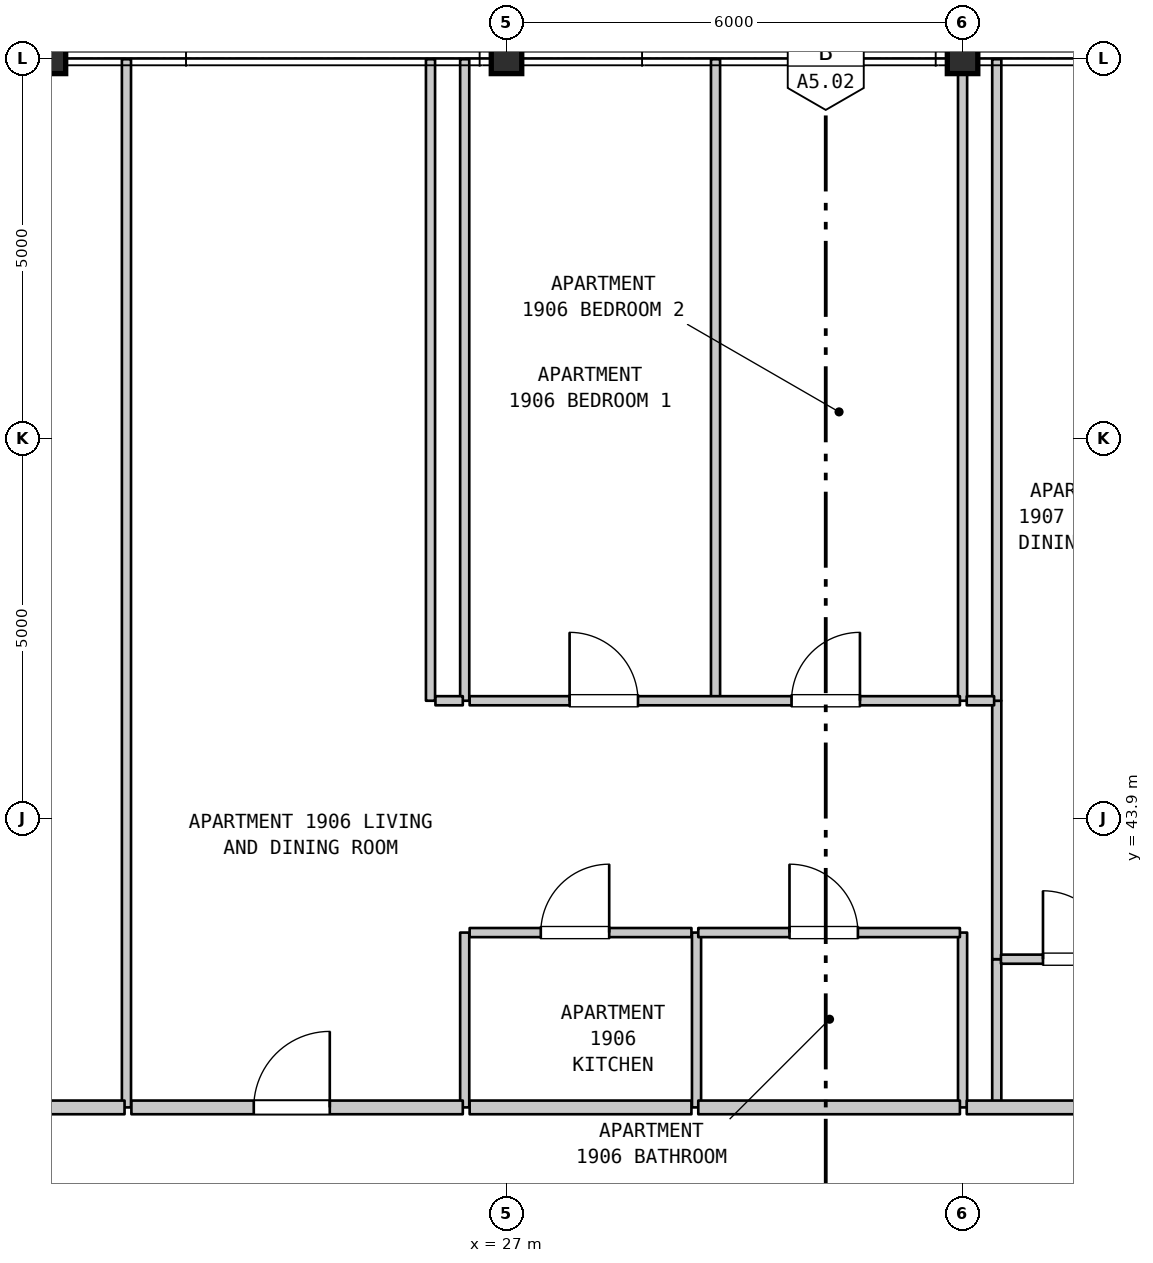
"""IFC4 building model, lengths in metres.
Left out: names, types, materials, properties, quantities, classifications, styles, units other than length and angle.
Written with IfcOpenShell. Run it as: python <this file> out.ifc"""

import sys

from ifc_helpers import new_model, si_unit, direction, frame, frame_2d, origin, origin_2d, place, context, subcontext, project, spatial, rectangle, i_section, extrude, element, fill, save


model = new_model("IFC4")
c1 = context("Model", 3, precision=1e-05, world=origin(), true_north=direction((0.0, 1.0)))
c2 = subcontext(c1, "Body", "Model", "MODEL_VIEW")
j1 = project(units=[si_unit("LENGTHUNIT", "METRE"), si_unit("PLANEANGLEUNIT", "RADIAN")], contexts=[c1])
p1 = place(None, origin())
s1 = spatial("IfcSite", under=j1, at=p1, CompositionType="ELEMENT")
p2 = place(p1, origin())
s2 = spatial("IfcBuilding", under=s1, at=p2, CompositionType="ELEMENT")
p3 = place(p2, frame((0.0, 0.0, 81.2)))
s3 = spatial("IfcBuildingStorey", under=s2, at=p3, CompositionType="ELEMENT", Elevation=81.2)
for number, where, z_axis, x_axis in (
    (1, (21.0, 53.9, 0.0), (0.0, 0.0, 1.0), (1.0, 0.0, 0.0)),
    (2, (27.0, 53.9, 0.0), (0.0, 0.0, 1.0), (1.0, 0.0, 0.0)),
    (3, (33.0, 53.9, 0.0), (0.0, 0.0, 1.0), (1.0, 0.0, 0.0)),
):
    element("IfcColumn", number, at=place(p3, frame(where, z_axis=z_axis, x_axis=x_axis)), inside=s3, PredefinedType="COLUMN", context=c2, shape_type="SweptSolid", body=[
        extrude(i_section(OverallWidth=0.401, OverallDepth=0.399, WebThickness=0.025, FlangeThickness=0.04, FilletRadius=0.015, at=origin_2d()), origin(), (0.0, 0.0, 1.0), 5.2),
    ])
p4 = place(p3, frame((22.0, 40.1, 0.0), z_axis=(0.0, 0.0, 1.0), x_axis=(0.0, 1.0, 0.0)))
e4 = element("IfcWall", 4, at=p4, inside=s3, PredefinedType="PARTITIONING", context=c2, shape_type="SweptSolid", body=[
    extrude(rectangle(XDim=13.79, YDim=0.12, at=frame_2d((6.895, 0.0))), origin(), (0.0, 0.0, 1.0), 4.885),
])
p5 = place(p3, frame((26.0, 45.45, 0.0), z_axis=(0.0, 0.0, 1.0), x_axis=(0.0, 1.0, 0.0)))
e5 = element("IfcWall", 5, at=p5, inside=s3, PredefinedType="PARTITIONING", context=c2, shape_type="SweptSolid", body=[
    extrude(rectangle(XDim=8.44, YDim=0.12, at=frame_2d((4.22, 0.0))), origin(), (0.0, 0.0, 1.0), 4.885),
])
p6 = place(p3, frame((26.45, 40.1, 0.0), z_axis=(0.0, 0.0, 1.0), x_axis=(0.0, 1.0, 0.0)))
e6 = element("IfcWall", 6, at=p6, inside=s3, PredefinedType="PARTITIONING", context=c2, shape_type="SweptSolid", body=[
    extrude(rectangle(XDim=2.3, YDim=0.12, at=frame_2d((1.15, 0.0))), origin(), (0.0, 0.0, 1.0), 4.885),
])
p7 = place(p3, frame((26.45, 45.45, 0.0), z_axis=(0.0, 0.0, 1.0), x_axis=(0.0, 1.0, 0.0)))
e7 = element("IfcWall", 7, at=p7, inside=s3, PredefinedType="PARTITIONING", context=c2, shape_type="SweptSolid", body=[
    extrude(rectangle(XDim=8.44, YDim=0.12, at=frame_2d((4.22, 0.0))), origin(), (0.0, 0.0, 1.0), 4.885),
])
p8 = place(p3, frame((29.5, 40.1, 0.0), z_axis=(0.0, 0.0, 1.0), x_axis=(0.0, 1.0, 0.0)))
e8 = element("IfcWall", 8, at=p8, inside=s3, PredefinedType="PARTITIONING", context=c2, shape_type="SweptSolid", body=[
    extrude(rectangle(XDim=2.3, YDim=0.12, at=frame_2d((1.15, 0.0))), origin(), (0.0, 0.0, 1.0), 4.885),
])
p9 = place(p3, frame((29.75, 45.45, 0.0), z_axis=(0.0, 0.0, 1.0), x_axis=(0.0, 1.0, 0.0)))
e9 = element("IfcWall", 9, at=p9, inside=s3, PredefinedType="PARTITIONING", context=c2, shape_type="SweptSolid", body=[
    extrude(rectangle(XDim=8.44, YDim=0.12, at=frame_2d((4.22, 0.0))), origin(), (0.0, 0.0, 1.0), 4.885),
])
p10 = place(p3, frame((33.0, 40.1, 0.0), z_axis=(0.0, 0.0, 1.0), x_axis=(0.0, 1.0, 0.0)))
e10 = element("IfcWall", 10, at=p10, inside=s3, PredefinedType="PARTITIONING", context=c2, shape_type="SweptSolid", body=[
    extrude(rectangle(XDim=2.3, YDim=0.12, at=frame_2d((1.15, 0.0))), origin(), (0.0, 0.0, 1.0), 4.285),
])
p11 = place(p3, frame((33.0, 45.45, 0.0), z_axis=(0.0, 0.0, 1.0), x_axis=(0.0, 1.0, 0.0)))
e11 = element("IfcWall", 11, at=p11, inside=s3, PredefinedType="PARTITIONING", context=c2, shape_type="SweptSolid", body=[
    extrude(rectangle(XDim=8.44, YDim=0.12, at=frame_2d((4.22, 0.0))), origin(), (0.0, 0.0, 1.0), 4.285),
])
p12 = place(p3, frame((33.45, 40.1, 0.0), z_axis=(0.0, 0.0, 1.0), x_axis=(0.0, 1.0, 0.0)))
e12 = element("IfcWall", 12, at=p12, inside=s3, PredefinedType="PARTITIONING", context=c2, shape_type="SweptSolid", body=[
    extrude(rectangle(XDim=1.95, YDim=0.12, at=frame_2d((0.975, 0.0))), origin(), (0.0, 0.0, 1.0), 4.885),
])
p13 = place(p3, frame((33.45, 42.05, 0.0), z_axis=(0.0, 0.0, 1.0), x_axis=(0.0, 1.0, 0.0)))
e13 = element("IfcWall", 13, at=p13, inside=s3, PredefinedType="PARTITIONING", context=c2, shape_type="SweptSolid", body=[
    extrude(rectangle(XDim=3.4, YDim=0.12, at=frame_2d((1.7, 0.0))), origin(), (0.0, 0.0, 1.0), 4.885),
])
p14 = place(p3, frame((33.45, 45.45, 0.0), z_axis=(0.0, 0.0, 1.0), x_axis=(0.0, 1.0, 0.0)))
e14 = element("IfcWall", 14, at=p14, inside=s3, PredefinedType="PARTITIONING", context=c2, shape_type="SweptSolid", body=[
    extrude(rectangle(XDim=8.44, YDim=0.12, at=frame_2d((4.22, 0.0))), origin(), (0.0, 0.0, 1.0), 4.885),
])
p15 = place(p3, frame((19.565, 40.1, 0.0), z_axis=(0.0, 0.0, 1.0), x_axis=(1.0, 0.0, 0.0)))
e15 = element("IfcWall", 15, at=p15, inside=s3, PredefinedType="STANDARD", context=c2, shape_type="SweptSolid", body=[
    extrude(rectangle(XDim=2.41, YDim=0.18, at=frame_2d((1.205, 0.0))), origin(), (0.0, 0.0, 1.0), 4.885),
])
p16 = place(p3, frame((22.065, 40.1, 0.0), z_axis=(0.0, 0.0, 1.0), x_axis=(1.0, 0.0, 0.0)))
e16 = element("IfcWall", 16, at=p16, inside=s3, PredefinedType="STANDARD", context=c2, shape_type="SweptSolid", body=[
    extrude(rectangle(XDim=4.36, YDim=0.18, at=frame_2d((2.18, 0.0))), origin(), (0.0, 0.0, 1.0), 4.885),
])
p17 = place(p16, frame((1.61, 0.0, 0.0)))
e17 = element("IfcOpeningElement", 17, at=p17, cuts=e16, PredefinedType="OPENING", context=c2, shape_type="SweptSolid", body=[
    extrude(rectangle(XDim=1.0, YDim=2.15, at=frame_2d((0.5, 1.075))), frame((0.0, 0.1, 0.0), z_axis=(0.0, -1.0, 0.0), x_axis=(1.0, 0.0, 0.0)), (0.0, 0.0, 1.0), 0.2),
])
p18 = place(p3, frame((26.515, 40.1, 0.0), z_axis=(0.0, 0.0, 1.0), x_axis=(1.0, 0.0, 0.0)))
e18 = element("IfcWall", 18, at=p18, inside=s3, PredefinedType="STANDARD", context=c2, shape_type="SweptSolid", body=[
    extrude(rectangle(XDim=2.918, YDim=0.18, at=frame_2d((1.459, 0.0))), origin(), (0.0, 0.0, 1.0), 4.885),
])
p19 = place(p3, frame((29.523, 40.1, 0.0), z_axis=(0.0, 0.0, 1.0), x_axis=(1.0, 0.0, 0.0)))
e19 = element("IfcWall", 19, at=p19, inside=s3, PredefinedType="STANDARD", context=c2, shape_type="SweptSolid", body=[
    extrude(rectangle(XDim=3.442, YDim=0.18, at=frame_2d((1.721, 0.0))), origin(), (0.0, 0.0, 1.0), 4.885),
])
p20 = place(p3, frame((33.055, 40.1, 0.0), z_axis=(0.0, 0.0, 1.0), x_axis=(1.0, 0.0, 0.0)))
e20 = element("IfcWall", 20, at=p20, inside=s3, PredefinedType="STANDARD", context=c2, shape_type="SweptSolid", body=[
    extrude(rectangle(XDim=5.445, YDim=0.18, at=frame_2d((2.723, 0.0))), origin(), (0.0, 0.0, 1.0), 4.885),
])
p21 = place(p20, frame((2.455, 0.0, 0.0)))
e21 = element("IfcOpeningElement", 21, at=p21, cuts=e20, PredefinedType="OPENING", context=c2, shape_type="SweptSolid", body=[
    extrude(rectangle(XDim=1.0, YDim=2.15, at=frame_2d((0.5, 1.075))), frame((0.0, 0.1, 0.0), z_axis=(0.0, -1.0, 0.0), x_axis=(1.0, 0.0, 0.0)), (0.0, 0.0, 1.0), 0.2),
])
p22 = place(p3, frame((33.505, 42.05, 0.0), z_axis=(0.0, 0.0, 1.0), x_axis=(1.0, 0.0, 0.0)))
e22 = element("IfcWall", 22, at=p22, inside=s3, PredefinedType="PARTITIONING", context=c2, shape_type="SweptSolid", body=[
    extrude(rectangle(XDim=2.16, YDim=0.12, at=frame_2d((1.08, 0.0))), origin(), (0.0, 0.0, 1.0), 4.885),
])
p23 = place(p22, frame((0.553, 0.0, 0.0)))
e23 = element("IfcOpeningElement", 23, at=p23, cuts=e22, PredefinedType="OPENING", context=c2, shape_type="SweptSolid", body=[
    extrude(rectangle(XDim=0.9, YDim=2.15, at=frame_2d((0.45, 1.075))), frame((0.0, 0.07, 0.0), z_axis=(0.0, -1.0, 0.0), x_axis=(1.0, 0.0, 0.0)), (0.0, 0.0, 1.0), 0.14),
])
p24 = place(p3, frame((26.515, 42.4, 0.0), z_axis=(0.0, 0.0, 1.0), x_axis=(1.0, 0.0, 0.0)))
e24 = element("IfcWall", 24, at=p24, inside=s3, PredefinedType="PARTITIONING", context=c2, shape_type="SweptSolid", body=[
    extrude(rectangle(XDim=2.918, YDim=0.12, at=frame_2d((1.459, 0.0))), origin(), (0.0, 0.0, 1.0), 4.885),
])
p25 = place(p24, frame((0.936, 0.0, 0.0)))
e25 = element("IfcOpeningElement", 25, at=p25, cuts=e24, PredefinedType="OPENING", context=c2, shape_type="SweptSolid", body=[
    extrude(rectangle(XDim=0.9, YDim=2.15, at=frame_2d((0.45, 1.075))), frame((0.0, 0.07, 0.0), z_axis=(0.0, -1.0, 0.0), x_axis=(1.0, 0.0, 0.0)), (0.0, 0.0, 1.0), 0.14),
])
p26 = place(p3, frame((29.523, 42.4, 0.0), z_axis=(0.0, 0.0, 1.0), x_axis=(1.0, 0.0, 0.0)))
e26 = element("IfcWall", 26, at=p26, inside=s3, PredefinedType="PARTITIONING", context=c2, shape_type="SweptSolid", body=[
    extrude(rectangle(XDim=3.442, YDim=0.12, at=frame_2d((1.721, 0.0))), origin(), (0.0, 0.0, 1.0), 4.885),
])
p27 = place(p26, frame((1.2, 0.0, 0.0)))
e27 = element("IfcOpeningElement", 27, at=p27, cuts=e26, PredefinedType="OPENING", context=c2, shape_type="SweptSolid", body=[
    extrude(rectangle(XDim=0.9, YDim=2.1, at=frame_2d((0.45, 1.05))), frame((0.0, 0.07, 0.0), z_axis=(0.0, -1.0, 0.0), x_axis=(1.0, 0.0, 0.0)), (0.0, 0.0, 1.0), 0.14),
])
p28 = place(p3, frame((26.065, 45.45, 0.0), z_axis=(0.0, 0.0, 1.0), x_axis=(1.0, 0.0, 0.0)))
e28 = element("IfcWall", 28, at=p28, inside=s3, PredefinedType="PARTITIONING", context=c2, shape_type="SweptSolid", body=[
    extrude(rectangle(XDim=0.36, YDim=0.12, at=frame_2d((0.18, 0.0))), origin(), (0.0, 0.0, 1.0), 4.885),
])
p29 = place(p3, frame((26.515, 45.45, 0.0), z_axis=(0.0, 0.0, 1.0), x_axis=(1.0, 0.0, 0.0)))
e29 = element("IfcWall", 29, at=p29, inside=s3, PredefinedType="PARTITIONING", context=c2, shape_type="SweptSolid", body=[
    extrude(rectangle(XDim=6.45, YDim=0.12, at=frame_2d((3.225, 0.0))), origin(), (0.0, 0.0, 1.0), 4.885),
])
p30 = place(p29, frame((1.315, 0.0, 0.0)))
e30 = element("IfcOpeningElement", 30, at=p30, cuts=e29, PredefinedType="OPENING", context=c2, shape_type="SweptSolid", body=[
    extrude(rectangle(XDim=0.9, YDim=2.15, at=frame_2d((0.45, 1.075))), frame((0.0, 0.07, 0.0), z_axis=(0.0, -1.0, 0.0), x_axis=(1.0, 0.0, 0.0)), (0.0, 0.0, 1.0), 0.14),
])
p31 = place(p29, frame((4.235, 0.0, 0.0)))
e31 = element("IfcOpeningElement", 31, at=p31, cuts=e29, PredefinedType="OPENING", context=c2, shape_type="SweptSolid", body=[
    extrude(rectangle(XDim=0.9, YDim=2.15, at=frame_2d((0.45, 1.075))), frame((0.0, 0.07, 0.0), z_axis=(0.0, -1.0, 0.0), x_axis=(1.0, 0.0, 0.0)), (0.0, 0.0, 1.0), 0.14),
])
p32 = place(p3, frame((33.055, 45.45, 0.0), z_axis=(0.0, 0.0, 1.0), x_axis=(1.0, 0.0, 0.0)))
e32 = element("IfcWall", 32, at=p32, inside=s3, PredefinedType="PARTITIONING", context=c2, shape_type="SweptSolid", body=[
    extrude(rectangle(XDim=0.36, YDim=0.12, at=frame_2d((0.18, 0.0))), origin(), (0.0, 0.0, 1.0), 4.885),
])
p33 = place(p17, origin())
e33 = element("IfcDoor", 33, at=p33, inside=s3, OperationType="SINGLE_SWING_RIGHT", PredefinedType="DOOR", context=c2, shape_type="SweptSolid", body=[
    extrude(rectangle(XDim=1.0, YDim=2.15, at=frame_2d((0.5, 1.075))), frame((0.0, 0.025, 0.0), z_axis=(0.0, -1.0, 0.0), x_axis=(1.0, 0.0, 0.0)), (0.0, 0.0, 1.0), 0.05),
])
fill(e17, e33)
p34 = place(p23, origin())
e34 = element("IfcDoor", 34, at=p34, inside=s3, OperationType="SINGLE_SWING_LEFT", PredefinedType="DOOR", context=c2, shape_type="SweptSolid", body=[
    extrude(rectangle(XDim=0.9, YDim=2.15, at=frame_2d((0.45, 1.075))), frame((0.0, 0.025, 0.0), z_axis=(0.0, -1.0, 0.0), x_axis=(1.0, 0.0, 0.0)), (0.0, 0.0, 1.0), 0.05),
])
fill(e23, e34)
p35 = place(p25, origin())
e35 = element("IfcDoor", 35, at=p35, inside=s3, OperationType="SINGLE_SWING_RIGHT", PredefinedType="DOOR", context=c2, shape_type="SweptSolid", body=[
    extrude(rectangle(XDim=0.9, YDim=2.15, at=frame_2d((0.45, 1.075))), frame((0.0, 0.025, 0.0), z_axis=(0.0, -1.0, 0.0), x_axis=(1.0, 0.0, 0.0)), (0.0, 0.0, 1.0), 0.05),
])
fill(e25, e35)
p36 = place(p27, origin())
e36 = element("IfcDoor", 36, at=p36, inside=s3, OperationType="SINGLE_SWING_LEFT", PredefinedType="DOOR", context=c2, shape_type="SweptSolid", body=[
    extrude(rectangle(XDim=0.9, YDim=2.1, at=frame_2d((0.45, 1.05))), frame((0.0, 0.025, 0.0), z_axis=(0.0, -1.0, 0.0), x_axis=(1.0, 0.0, 0.0)), (0.0, 0.0, 1.0), 0.05),
])
fill(e27, e36)
p37 = place(p30, origin())
e37 = element("IfcDoor", 37, at=p37, inside=s3, OperationType="SINGLE_SWING_LEFT", PredefinedType="DOOR", context=c2, shape_type="SweptSolid", body=[
    extrude(rectangle(XDim=0.9, YDim=2.15, at=frame_2d((0.45, 1.075))), frame((0.0, 0.025, 0.0), z_axis=(0.0, -1.0, 0.0), x_axis=(1.0, 0.0, 0.0)), (0.0, 0.0, 1.0), 0.05),
])
fill(e30, e37)
p38 = place(p31, origin())
e38 = element("IfcDoor", 38, at=p38, inside=s3, OperationType="SINGLE_SWING_RIGHT", PredefinedType="DOOR", context=c2, shape_type="SweptSolid", body=[
    extrude(rectangle(XDim=0.9, YDim=2.15, at=frame_2d((0.45, 1.075))), frame((0.0, 0.025, 0.0), z_axis=(0.0, -1.0, 0.0), x_axis=(1.0, 0.0, 0.0)), (0.0, 0.0, 1.0), 0.05),
])
fill(e31, e38)
save(model, sys.argv[1])
